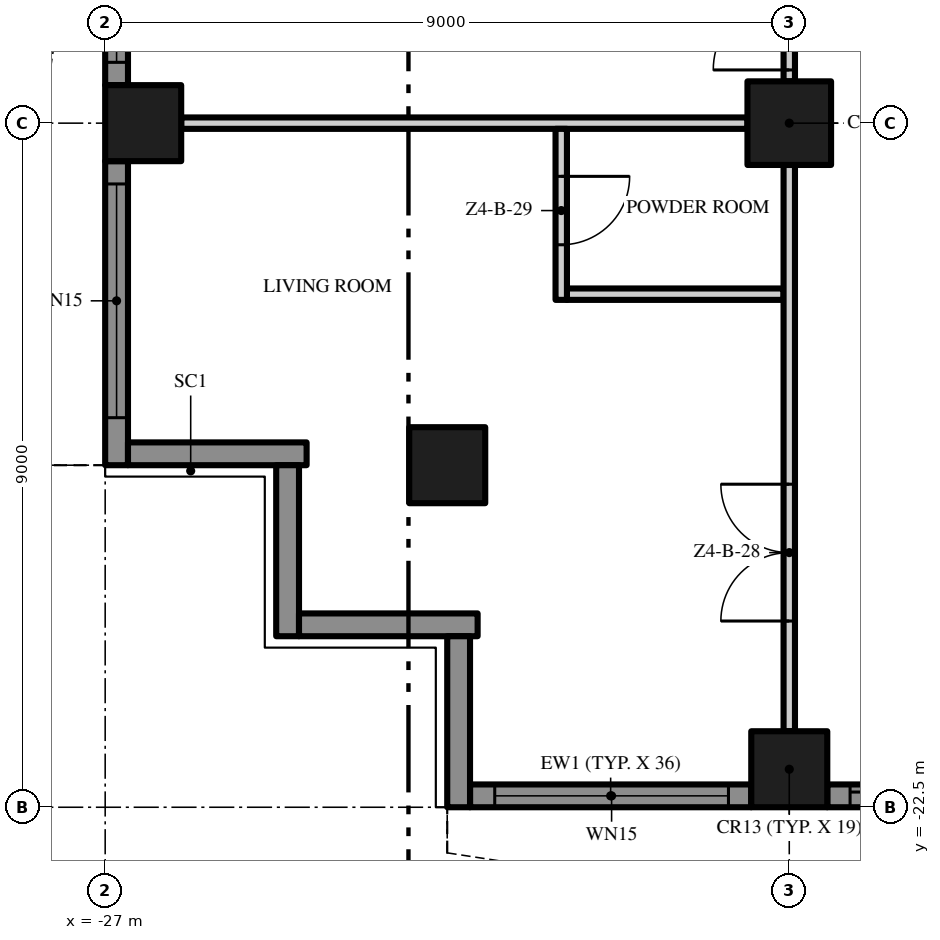
"""IFC4 building model, lengths in metres.
Left out: names, types, materials, properties, quantities, classifications, styles, units other than length and angle.
Written with IfcOpenShell. Run it as: python <this file> out.ifc"""

import sys

from ifc_helpers import new_model, si_unit, direction, frame, frame_2d, origin, origin_2d, place, context, subcontext, project, spatial, polyline, rectangle, outline, extrude, element, fill, save


model = new_model("IFC4")
c1 = context("Model", 3, precision=1e-05, world=origin(), true_north=direction((0.0, 1.0)))
c2 = subcontext(c1, "Body", "Model", "MODEL_VIEW")
j1 = project(units=[si_unit("LENGTHUNIT", "METRE"), si_unit("PLANEANGLEUNIT", "RADIAN")], contexts=[c1])
p1 = place(None, origin())
s1 = spatial("IfcSite", under=j1, at=p1, CompositionType="ELEMENT")
p2 = place(p1, origin())
s2 = spatial("IfcBuilding", under=s1, at=p2, CompositionType="ELEMENT")
p3 = place(p2, frame((0.0, 0.0, 203.4)))
s3 = spatial("IfcBuildingStorey", under=s2, at=p3, CompositionType="ELEMENT", Elevation=203.4)
p4 = place(p3, frame((-18.0, -13.5, 0.0), z_axis=(0.0, 0.0, 1.0), x_axis=(1.0, 0.0, 0.0)))
e1 = element("IfcColumn", 1, at=p4, inside=s3, PredefinedType="COLUMN", context=c2, shape_type="SweptSolid", body=[
    extrude(rectangle(XDim=1.1, YDim=1.1, at=origin_2d()), origin(), (0.0, 0.0, 1.0), 3.5),
])
for number, where, z_axis, x_axis in (
    (2, (-18.0, -22.0, 0.0), (0.0, 0.0, 1.0), (1.0, 0.0, 0.0)),
    (3, (-26.5, -13.5, 0.0), (0.0, 0.0, 1.0), (1.0, 0.0, 0.0)),
    (4, (-22.5, -18.0, 0.0), (0.0, 0.0, 1.0), (1.0, 0.0, 0.0)),
):
    element("IfcColumn", number, at=place(p3, frame(where, z_axis=z_axis, x_axis=x_axis)), inside=s3, PredefinedType="COLUMN", context=c2, shape_type="SweptSolid", body=[
        extrude(rectangle(XDim=1.0, YDim=1.0, at=origin_2d()), origin(), (0.0, 0.0, 1.0), 3.5),
    ])
p5 = place(p3, frame((-18.5, -22.35, 0.0), z_axis=(0.0, 0.0, 1.0), x_axis=(-1.0, 0.0, 0.0)))
e5 = element("IfcWall", 5, at=p5, inside=s3, PredefinedType="SOLIDWALL", context=c2, shape_type="SweptSolid", body=[
    extrude(rectangle(XDim=3.7, YDim=0.3, at=frame_2d((1.85, 0.0))), origin(), (0.0, 0.0, 1.0), 3.5),
])
p6 = place(p5, frame((0.3, 0.0, 0.45)))
e6 = element("IfcOpeningElement", 6, at=p6, cuts=e5, PredefinedType="OPENING", context=c2, shape_type="SweptSolid", body=[
    extrude(rectangle(XDim=3.075, YDim=2.65, at=frame_2d((1.538, 1.325))), frame((0.0, 0.16, 0.0), z_axis=(0.0, -1.0, 0.0), x_axis=(1.0, 0.0, 0.0)), (0.0, 0.0, 1.0), 0.32),
])
p7 = place(p3, frame((-9.5, -22.35, 0.0), z_axis=(0.0, 0.0, 1.0), x_axis=(-1.0, 0.0, 0.0)))
e7 = element("IfcWall", 7, at=p7, inside=s3, PredefinedType="SOLIDWALL", context=c2, shape_type="SweptSolid", body=[
    extrude(rectangle(XDim=8.0, YDim=0.3, at=frame_2d((4.0, 0.0))), origin(), (0.0, 0.0, 1.0), 3.5),
])
p8 = place(p7, frame((4.625, 0.0, 0.0)))
e8 = element("IfcOpeningElement", 8, at=p8, cuts=e7, PredefinedType="OPENING", context=c2, shape_type="SweptSolid", body=[
    extrude(rectangle(XDim=3.075, YDim=2.4, at=frame_2d((1.538, 1.2))), frame((0.0, 0.16, 0.0), z_axis=(0.0, -1.0, 0.0), x_axis=(1.0, 0.0, 0.0)), (0.0, 0.0, 1.0), 0.32),
])
p9 = place(p7, frame((0.3, 0.0, 0.45)))
e9 = element("IfcOpeningElement", 9, at=p9, cuts=e7, PredefinedType="OPENING", context=c2, shape_type="SweptSolid", body=[
    extrude(rectangle(XDim=3.075, YDim=2.65, at=frame_2d((1.538, 1.325))), frame((0.0, 0.16, 0.0), z_axis=(0.0, -1.0, 0.0), x_axis=(1.0, 0.0, 0.0)), (0.0, 0.0, 1.0), 0.32),
])
p10 = place(p3, frame((-26.85, -13.0, 0.0), z_axis=(0.0, 0.0, 1.0), x_axis=(0.0, 1.0, 0.0)))
e10 = element("IfcWall", 10, at=p10, inside=s3, PredefinedType="SOLIDWALL", context=c2, shape_type="SweptSolid", body=[
    extrude(rectangle(XDim=8.0, YDim=0.3, at=frame_2d((4.0, 0.0))), origin(), (0.0, 0.0, 1.0), 3.5),
])
p11 = place(p10, frame((4.625, 0.0, 0.0)))
e11 = element("IfcOpeningElement", 11, at=p11, cuts=e10, PredefinedType="OPENING", context=c2, shape_type="SweptSolid", body=[
    extrude(rectangle(XDim=3.075, YDim=2.4, at=frame_2d((1.538, 1.2))), frame((0.0, 0.16, 0.0), z_axis=(0.0, -1.0, 0.0), x_axis=(1.0, 0.0, 0.0)), (0.0, 0.0, 1.0), 0.32),
])
p12 = place(p10, frame((0.3, 0.0, 0.45)))
e12 = element("IfcOpeningElement", 12, at=p12, cuts=e10, PredefinedType="OPENING", context=c2, shape_type="SweptSolid", body=[
    extrude(rectangle(XDim=3.075, YDim=2.65, at=frame_2d((1.538, 1.325))), frame((0.0, 0.16, 0.0), z_axis=(0.0, -1.0, 0.0), x_axis=(1.0, 0.0, 0.0)), (0.0, 0.0, 1.0), 0.32),
])
p13 = place(p3, frame((-26.85, -18.0, 0.0), z_axis=(0.0, 0.0, 1.0), x_axis=(0.0, 1.0, 0.0)))
e13 = element("IfcWall", 13, at=p13, inside=s3, PredefinedType="SOLIDWALL", context=c2, shape_type="SweptSolid", body=[
    extrude(rectangle(XDim=4.0, YDim=0.3, at=frame_2d((2.0, 0.0))), origin(), (0.0, 0.0, 1.0), 3.5),
])
p14 = place(p13, frame((0.625, 0.0, 0.45)))
e14 = element("IfcOpeningElement", 14, at=p14, cuts=e13, PredefinedType="OPENING", context=c2, shape_type="SweptSolid", body=[
    extrude(rectangle(XDim=3.075, YDim=2.65, at=frame_2d((1.538, 1.325))), frame((0.0, 0.16, 0.0), z_axis=(0.0, -1.0, 0.0), x_axis=(1.0, 0.0, 0.0)), (0.0, 0.0, 1.0), 0.32),
])
p15 = place(p3, frame((-24.35, -17.85, 0.0), z_axis=(0.0, 0.0, 1.0), x_axis=(-1.0, 0.0, 0.0)))
e15 = element("IfcWall", 15, at=p15, inside=s3, PredefinedType="SOLIDWALL", context=c2, shape_type="SweptSolid", body=[
    extrude(rectangle(XDim=2.35, YDim=0.3, at=frame_2d((1.175, 0.0))), origin(), (0.0, 0.0, 1.0), 3.5),
])
p16 = place(p3, frame((-24.6, -20.25, 0.0), z_axis=(0.0, 0.0, 1.0), x_axis=(0.0, 1.0, 0.0)))
e16 = element("IfcWall", 16, at=p16, inside=s3, PredefinedType="SOLIDWALL", context=c2, shape_type="SweptSolid", body=[
    extrude(rectangle(XDim=2.25, YDim=0.3, at=frame_2d((1.125, 0.0))), origin(), (0.0, 0.0, 1.0), 3.5),
])
p17 = place(p3, frame((-22.1, -20.1, 0.0), z_axis=(0.0, 0.0, 1.0), x_axis=(-1.0, 0.0, 0.0)))
e17 = element("IfcWall", 17, at=p17, inside=s3, PredefinedType="SOLIDWALL", context=c2, shape_type="SweptSolid", body=[
    extrude(rectangle(XDim=2.35, YDim=0.3, at=frame_2d((1.175, 0.0))), origin(), (0.0, 0.0, 1.0), 3.5),
])
p18 = place(p3, frame((-22.35, -22.5, 0.0), z_axis=(0.0, 0.0, 1.0), x_axis=(0.0, 1.0, 0.0)))
e18 = element("IfcWall", 18, at=p18, inside=s3, PredefinedType="SOLIDWALL", context=c2, shape_type="SweptSolid", body=[
    extrude(rectangle(XDim=2.25, YDim=0.3, at=frame_2d((1.125, 0.0))), origin(), (0.0, 0.0, 1.0), 3.5),
])
p19 = place(p3, origin())
e19 = element("IfcWall", 19, at=p19, inside=s3, PredefinedType="USERDEFINED", context=c2, shape_type="SweptSolid", body=[
    extrude(outline(polyline([(-22.5, -23.1), (-21.0, -23.329), (-19.5, -23.929), (-18.0, -24.671), (-16.5, -25.271), (-15.0, -25.5), (-13.5, -25.271), (-12.0, -24.671), (-10.5, -23.929), (-9.0, -23.329), (-7.5, -23.1), (-6.0, -23.329), (-4.5, -23.929), (-3.0, -24.671), (-1.5, -25.271), (0.0, -25.5), (1.5, -25.271), (3.0, -24.671), (4.5, -23.929), (6.0, -23.329), (7.5, -23.1), (9.0, -23.329), (10.5, -23.929), (12.0, -24.671), (13.5, -25.271), (15.0, -25.5), (16.5, -25.271), (18.0, -24.671), (19.5, -23.929), (21.0, -23.329), (22.5, -23.1), (22.462, -22.853), (20.934, -23.086), (19.398, -23.701), (17.898, -24.442), (16.434, -25.028), (15.0, -25.247), (13.566, -25.028), (12.102, -24.442), (10.602, -23.701), (9.066, -23.086), (7.5, -22.847), (5.934, -23.086), (4.398, -23.701), (2.898, -24.442), (1.434, -25.028), (0.0, -25.247), (-1.434, -25.028), (-2.898, -24.442), (-4.398, -23.701), (-5.934, -23.086), (-7.5, -22.847), (-9.066, -23.086), (-10.602, -23.701), (-12.102, -24.442), (-13.566, -25.028), (-15.0, -25.247), (-16.434, -25.028), (-17.898, -24.442), (-19.398, -23.701), (-20.934, -23.086), (-22.462, -22.853), (-22.5, -23.1)])), origin(), (0.0, 0.0, 1.0), 0.9),
])
p20 = place(p3, origin())
e20 = element("IfcWall", 20, at=p20, inside=s3, PredefinedType="USERDEFINED", context=c2, shape_type="SweptSolid", body=[
    extrude(outline(polyline([(-27.6, 18.0), (-27.829, 16.5), (-28.429, 15.0), (-29.171, 13.5), (-29.771, 12.0), (-30.0, 10.5), (-29.771, 9.0), (-29.171, 7.5), (-28.429, 6.0), (-27.829, 4.5), (-27.6, 3.0), (-27.829, 1.5), (-28.429, 0.0), (-29.171, -1.5), (-29.771, -3.0), (-30.0, -4.5), (-29.771, -6.0), (-29.171, -7.5), (-28.429, -9.0), (-27.829, -10.5), (-27.6, -12.0), (-27.829, -13.5), (-28.429, -15.0), (-29.171, -16.5), (-29.771, -18.0), (-29.539, -18.093), (-28.942, -16.602), (-28.201, -15.102), (-27.586, -13.566), (-27.347, -12.0), (-27.586, -10.434), (-28.201, -8.898), (-28.942, -7.398), (-29.528, -5.934), (-29.747, -4.5), (-29.528, -3.066), (-28.942, -1.602), (-28.201, -0.102), (-27.586, 1.434), (-27.347, 3.0), (-27.586, 4.566), (-28.201, 6.102), (-28.942, 7.602), (-29.528, 9.066), (-29.747, 10.5), (-29.528, 11.934), (-28.942, 13.398), (-28.201, 14.898), (-27.586, 16.434), (-27.353, 17.962), (-27.6, 18.0)])), origin(), (0.0, 0.0, 1.0), 0.9),
])
p21 = place(p3, frame((-20.925, -15.75, 0.0), z_axis=(0.0, 0.0, 1.0), x_axis=(1.0, 0.0, 0.0)))
e21 = element("IfcWall", 21, at=p21, inside=s3, PredefinedType="PARTITIONING", context=c2, shape_type="SweptSolid", body=[
    extrude(rectangle(XDim=2.85, YDim=0.15, at=frame_2d((1.425, 0.0))), origin(), (0.0, 0.0, 1.0), 3.5),
])
p22 = place(p3, frame((-26.0, -13.5, 0.0), z_axis=(0.0, 0.0, 1.0), x_axis=(1.0, 0.0, 0.0)))
e22 = element("IfcWall", 22, at=p22, inside=s3, PredefinedType="PARTITIONING", context=c2, shape_type="SweptSolid", body=[
    extrude(rectangle(XDim=7.45, YDim=0.15, at=frame_2d((3.725, 0.0))), origin(), (0.0, 0.0, 1.0), 3.5),
])
p23 = place(p3, frame((-21.0, -13.575, 0.0), z_axis=(0.0, 0.0, 1.0), x_axis=(0.0, -1.0, 0.0)))
e23 = element("IfcWall", 23, at=p23, inside=s3, PredefinedType="PARTITIONING", context=c2, shape_type="SweptSolid", body=[
    extrude(rectangle(XDim=2.25, YDim=0.15, at=frame_2d((1.125, 0.0))), origin(), (0.0, 0.0, 1.0), 3.5),
])
p24 = place(p23, frame((0.625, 0.0, 0.0)))
e24 = element("IfcOpeningElement", 24, at=p24, cuts=e23, PredefinedType="OPENING", context=c2, shape_type="SweptSolid", body=[
    extrude(rectangle(XDim=0.9, YDim=2.1, at=frame_2d((0.45, 1.05))), frame((0.0, 0.085, 0.0), z_axis=(0.0, -1.0, 0.0), x_axis=(1.0, 0.0, 0.0)), (0.0, 0.0, 1.0), 0.17),
])
p25 = place(p3, frame((-18.0, -21.5, 0.0), z_axis=(0.0, 0.0, 1.0), x_axis=(0.0, 1.0, 0.0)))
e25 = element("IfcWall", 25, at=p25, inside=s3, PredefinedType="PARTITIONING", context=c2, shape_type="SweptSolid", body=[
    extrude(rectangle(XDim=7.45, YDim=0.15, at=frame_2d((3.725, 0.0))), origin(), (0.0, 0.0, 1.0), 3.5),
])
p26 = place(p25, frame((1.45, 0.0, 0.0)))
e26 = element("IfcOpeningElement", 26, at=p26, cuts=e25, PredefinedType="OPENING", context=c2, shape_type="SweptSolid", body=[
    extrude(rectangle(XDim=1.8, YDim=2.4, at=frame_2d((0.9, 1.2))), frame((0.0, 0.085, 0.0), z_axis=(0.0, -1.0, 0.0), x_axis=(1.0, 0.0, 0.0)), (0.0, 0.0, 1.0), 0.17),
])
p27 = place(p3, frame((-18.0, -12.95, 0.0), z_axis=(0.0, 0.0, 1.0), x_axis=(0.0, 1.0, 0.0)))
e27 = element("IfcWall", 27, at=p27, inside=s3, PredefinedType="PARTITIONING", context=c2, shape_type="SweptSolid", body=[
    extrude(rectangle(XDim=7.9, YDim=0.15, at=frame_2d((3.95, 0.0))), origin(), (0.0, 0.0, 1.0), 3.5),
])
p28 = place(p27, frame((6.75, 0.0, 0.0)))
e28 = element("IfcOpeningElement", 28, at=p28, cuts=e27, PredefinedType="OPENING", context=c2, shape_type="SweptSolid", body=[
    extrude(rectangle(XDim=1.0, YDim=2.4, at=frame_2d((0.5, 1.2))), frame((0.0, 0.085, 0.0), z_axis=(0.0, -1.0, 0.0), x_axis=(1.0, 0.0, 0.0)), (0.0, 0.0, 1.0), 0.17),
])
p29 = place(p27, frame((0.15, 0.0, 0.0)))
e29 = element("IfcOpeningElement", 29, at=p29, cuts=e27, PredefinedType="OPENING", context=c2, shape_type="SweptSolid", body=[
    extrude(rectangle(XDim=1.0, YDim=2.4, at=frame_2d((0.5, 1.2))), frame((0.0, 0.085, 0.0), z_axis=(0.0, -1.0, 0.0), x_axis=(1.0, 0.0, 0.0)), (0.0, 0.0, 1.0), 0.17),
])
p30 = place(p6, origin())
e30 = element("IfcWindow", 30, at=p30, inside=s3, PartitioningType="SINGLE_PANEL", PredefinedType="WINDOW", context=c2, shape_type="SweptSolid", body=[
    extrude(rectangle(XDim=3.075, YDim=2.65, at=frame_2d((1.538, 1.325))), frame((0.0, 0.03, 0.0), z_axis=(0.0, -1.0, 0.0), x_axis=(1.0, 0.0, 0.0)), (0.0, 0.0, 1.0), 0.06),
])
fill(e6, e30)
p31 = place(p8, origin())
e31 = element("IfcDoor", 31, at=p31, inside=s3, OperationType="SINGLE_SWING_LEFT", PredefinedType="DOOR", context=c2, shape_type="SweptSolid", body=[
    extrude(rectangle(XDim=3.075, YDim=2.4, at=frame_2d((1.538, 1.2))), frame((0.0, 0.025, 0.0), z_axis=(0.0, -1.0, 0.0), x_axis=(1.0, 0.0, 0.0)), (0.0, 0.0, 1.0), 0.05),
])
fill(e8, e31)
p32 = place(p12, origin())
e32 = element("IfcWindow", 32, at=p32, inside=s3, PartitioningType="SINGLE_PANEL", PredefinedType="WINDOW", context=c2, shape_type="SweptSolid", body=[
    extrude(rectangle(XDim=3.075, YDim=2.65, at=frame_2d((1.538, 1.325))), frame((0.0, 0.03, 0.0), z_axis=(0.0, -1.0, 0.0), x_axis=(1.0, 0.0, 0.0)), (0.0, 0.0, 1.0), 0.06),
])
fill(e12, e32)
p33 = place(p14, origin())
e33 = element("IfcWindow", 33, at=p33, inside=s3, PartitioningType="SINGLE_PANEL", PredefinedType="WINDOW", context=c2, shape_type="SweptSolid", body=[
    extrude(rectangle(XDim=3.075, YDim=2.65, at=frame_2d((1.538, 1.325))), frame((0.0, 0.03, 0.0), z_axis=(0.0, -1.0, 0.0), x_axis=(1.0, 0.0, 0.0)), (0.0, 0.0, 1.0), 0.06),
])
fill(e14, e33)
p34 = place(p29, origin())
e34 = element("IfcDoor", 34, at=p34, inside=s3, OperationType="SINGLE_SWING_LEFT", PredefinedType="DOOR", context=c2, shape_type="SweptSolid", body=[
    extrude(rectangle(XDim=1.0, YDim=2.4, at=frame_2d((0.5, 1.2))), frame((0.0, 0.025, 0.0), z_axis=(0.0, -1.0, 0.0), x_axis=(1.0, 0.0, 0.0)), (0.0, 0.0, 1.0), 0.05),
])
fill(e29, e34)
p35 = place(p26, origin())
e35 = element("IfcDoor", 35, at=p35, inside=s3, OperationType="DOUBLE_DOOR_SINGLE_SWING", PredefinedType="DOOR", context=c2, shape_type="SweptSolid", body=[
    extrude(rectangle(XDim=1.8, YDim=2.4, at=frame_2d((0.9, 1.2))), frame((0.0, 0.025, 0.0), z_axis=(0.0, -1.0, 0.0), x_axis=(1.0, 0.0, 0.0)), (0.0, 0.0, 1.0), 0.05),
])
fill(e26, e35)
p36 = place(p24, origin())
e36 = element("IfcDoor", 36, at=p36, inside=s3, OperationType="SINGLE_SWING_LEFT", PredefinedType="DOOR", context=c2, shape_type="SweptSolid", body=[
    extrude(rectangle(XDim=0.9, YDim=2.1, at=frame_2d((0.45, 1.05))), frame((0.0, 0.025, 0.0), z_axis=(0.0, -1.0, 0.0), x_axis=(1.0, 0.0, 0.0)), (0.0, 0.0, 1.0), 0.05),
])
fill(e24, e36)
save(model, sys.argv[1])
